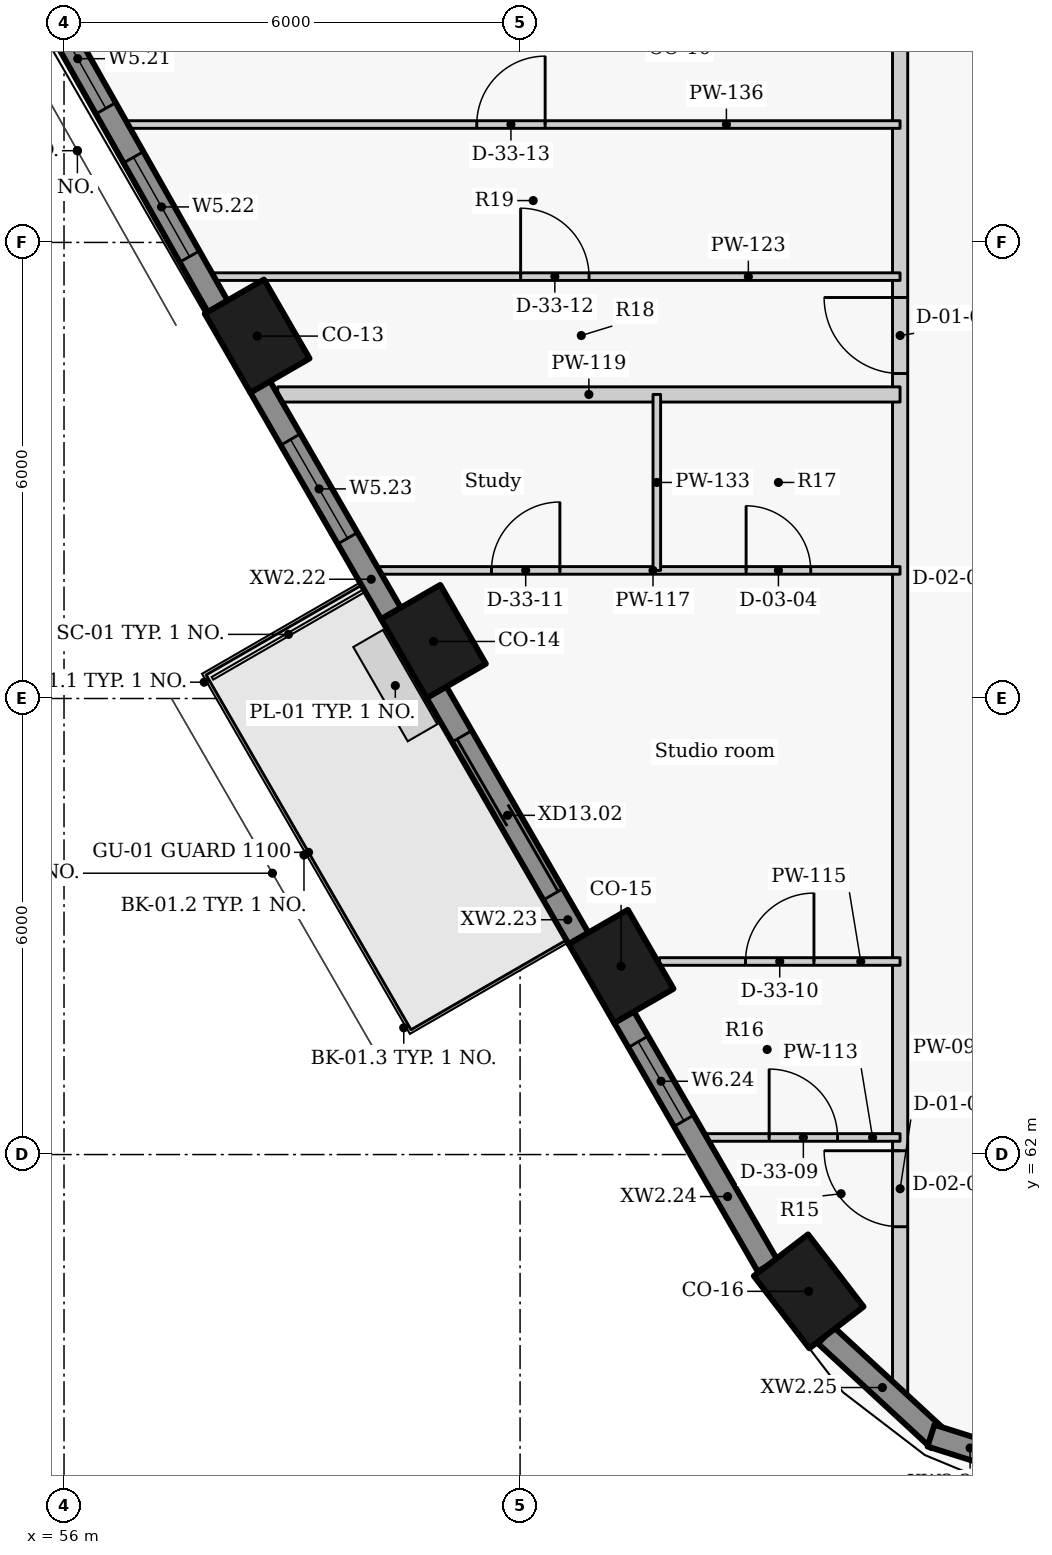
"""IFC4 building model, lengths in metres.
Left out: names, types, materials, properties, quantities, classifications, styles, units other than length and angle.
Written with IfcOpenShell. Run it as: python <this file> out.ifc"""

import sys

from ifc_helpers import new_model, si_unit, direction, frame, frame_2d, origin, origin_2d, place, context, subcontext, project, spatial, rectangle, extrude, element, fill, save


model = new_model("IFC4")
c1 = context("Model", 3, precision=1e-05, world=origin(), true_north=direction((0.0, 1.0)))
c2 = subcontext(c1, "Body", "Model", "MODEL_VIEW")
j1 = project(units=[si_unit("LENGTHUNIT", "METRE"), si_unit("PLANEANGLEUNIT", "RADIAN")], contexts=[c1])
p1 = place(None, origin())
s1 = spatial("IfcSite", under=j1, at=p1, CompositionType="ELEMENT")
p2 = place(p1, origin())
s2 = spatial("IfcBuilding", under=s1, at=p2, CompositionType="ELEMENT")
p3 = place(p2, frame((0.0, 0.0, 176.7)))
s3 = spatial("IfcBuildingStorey", under=s2, at=p3, CompositionType="ELEMENT", Elevation=176.7)
for number, where, z_axis, x_axis in (
    (1, (58.541, 72.768, 0.0), (0.0, 0.0, 1.0), (0.5, -0.866, 0.0)),
    (2, (60.861, 68.75, 0.0), (0.0, 0.0, 1.0), (0.5, -0.866, 0.0)),
    (3, (63.329, 64.475, 0.0), (0.0, 0.0, 1.0), (0.5, -0.866, 0.0)),
    (4, (65.797, 60.2, 0.0), (0.0, 0.0, 1.0), (0.609, -0.793, 0.0)),
):
    element("IfcColumn", number, at=place(p3, frame(where, z_axis=z_axis, x_axis=x_axis)), inside=s3, PredefinedType="COLUMN", context=c2, shape_type="SweptSolid", body=[
        extrude(rectangle(XDim=1.2, YDim=0.9, at=origin_2d()), origin(), (0.0, 0.0, 1.0), 3.3),
    ])
p4 = place(p3, frame((55.373, 77.846, 0.0), z_axis=(0.0, 0.0, 1.0), x_axis=(0.492033360928, -0.870576344575, 0.0)))
e5 = element("IfcWall", 5, at=p4, inside=s3, PredefinedType="SOLIDWALL", context=c2, shape_type="SweptSolid", body=[
    extrude(rectangle(XDim=5.387, YDim=0.3, at=frame_2d((2.693, 0.0))), origin(), (0.0, 0.0, 1.0), 2.425),
])
p5 = place(p4, frame((0.892, 0.0, 0.9)))
e6 = element("IfcOpeningElement", 6, at=p5, cuts=e5, PredefinedType="OPENING", context=c2, shape_type="SweptSolid", body=[
    extrude(rectangle(XDim=1.5, YDim=1.1, at=frame_2d((0.75, 0.55))), frame((0.0, 0.16, 0.0), z_axis=(0.0, -1.0, 0.0), x_axis=(1.0, 0.0, 0.0)), (0.0, 0.0, 1.0), 0.32),
])
p6 = place(p4, frame((3.132, 0.0, 0.9)))
e7 = element("IfcOpeningElement", 7, at=p6, cuts=e5, PredefinedType="OPENING", context=c2, shape_type="SweptSolid", body=[
    extrude(rectangle(XDim=1.5, YDim=1.1, at=frame_2d((0.75, 0.55))), frame((0.0, 0.16, 0.0), z_axis=(0.0, -1.0, 0.0), x_axis=(1.0, 0.0, 0.0)), (0.0, 0.0, 1.0), 0.32),
])
p7 = place(p3, frame((58.579, 72.102, 0.0), z_axis=(0.0, 0.0, 1.0), x_axis=(0.499955427682, -0.866051136095, 0.0)))
e8 = element("IfcWall", 8, at=p7, inside=s3, PredefinedType="SOLIDWALL", context=c2, shape_type="SweptSolid", body=[
    extrude(rectangle(XDim=3.447, YDim=0.3, at=frame_2d((1.724, 0.0))), origin(), (0.0, 0.0, 1.0), 2.425),
])
p8 = place(p7, frame((0.802, 0.0, 0.9)))
e9 = element("IfcOpeningElement", 9, at=p8, cuts=e8, PredefinedType="OPENING", context=c2, shape_type="SweptSolid", body=[
    extrude(rectangle(XDim=1.5, YDim=1.1, at=frame_2d((0.75, 0.55))), frame((0.0, 0.16, 0.0), z_axis=(0.0, -1.0, 0.0), x_axis=(1.0, 0.0, 0.0)), (0.0, 0.0, 1.0), 0.32),
])
p9 = place(p3, frame((60.899, 68.084, 0.0), z_axis=(0.0, 0.0, 1.0), x_axis=(0.500059225181, -0.86599120741, 0.0)))
e10 = element("IfcWall", 10, at=p9, inside=s3, PredefinedType="SOLIDWALL", context=c2, shape_type="SweptSolid", body=[
    extrude(rectangle(XDim=3.744, YDim=0.3, at=frame_2d((1.872, 0.0))), origin(), (0.0, 0.0, 1.0), 2.425),
])
p10 = place(p9, frame((0.672, 0.0, 0.0)))
e11 = element("IfcOpeningElement", 11, at=p10, cuts=e10, PredefinedType="OPENING", context=c2, shape_type="SweptSolid", body=[
    extrude(rectangle(XDim=2.4, YDim=2.0, at=frame_2d((1.2, 1.0))), frame((0.0, 0.16, 0.0), z_axis=(0.0, -1.0, 0.0), x_axis=(1.0, 0.0, 0.0)), (0.0, 0.0, 1.0), 0.32),
])
p11 = place(p3, frame((63.367, 63.809, 0.0), z_axis=(0.0, 0.0, 1.0), x_axis=(0.499961087031, -0.866047869032, 0.0)))
e12 = element("IfcWall", 12, at=p11, inside=s3, PredefinedType="SOLIDWALL", context=c2, shape_type="SweptSolid", body=[
    extrude(rectangle(XDim=3.779, YDim=0.3, at=frame_2d((1.889, 0.0))), origin(), (0.0, 0.0, 1.0), 2.425),
])
p12 = place(p11, frame((0.376, 0.0, 0.9)))
e13 = element("IfcOpeningElement", 13, at=p12, cuts=e12, PredefinedType="OPENING", context=c2, shape_type="SweptSolid", body=[
    extrude(rectangle(XDim=1.2, YDim=1.1, at=frame_2d((0.6, 0.55))), frame((0.0, 0.16, 0.0), z_axis=(0.0, -1.0, 0.0), x_axis=(1.0, 0.0, 0.0)), (0.0, 0.0, 1.0), 0.32),
])
p13 = place(p3, frame((66.022, 59.622, 0.0), z_axis=(0.0, 0.0, 1.0), x_axis=(0.734627852992, -0.678470277616, 0.0)))
e14 = element("IfcWall", 14, at=p13, inside=s3, PredefinedType="SOLIDWALL", context=c2, shape_type="SweptSolid", body=[
    extrude(rectangle(XDim=2.026, YDim=0.3, at=frame_2d((1.013, 0.0))), origin(), (0.0, 0.0, 1.0), 2.425),
])
p14 = place(p3, frame((67.406, 58.302, 0.0), z_axis=(0.0, 0.0, 1.0), x_axis=(0.953537608367, -0.301274010545, 0.0)))
e15 = element("IfcWall", 15, at=p14, inside=s3, PredefinedType="SOLIDWALL", context=c2, shape_type="SweptSolid", body=[
    extrude(rectangle(XDim=2.048, YDim=0.3, at=frame_2d((1.024, 0.0))), origin(), (0.0, 0.0, 1.0), 2.425),
])
p15 = place(p14, frame((1.18, 0.0, 0.9)))
e16 = element("IfcOpeningElement", 16, at=p15, cuts=e15, PredefinedType="OPENING", context=c2, shape_type="SweptSolid", body=[
    extrude(rectangle(XDim=0.6, YDim=1.1, at=frame_2d((0.3, 0.55))), frame((0.0, 0.16, 0.0), z_axis=(0.0, -1.0, 0.0), x_axis=(1.0, 0.0, 0.0)), (0.0, 0.0, 1.0), 0.32),
])
p16 = place(p3, frame((67.0, 58.674, 0.0), z_axis=(0.0, 0.0, 1.0), x_axis=(0.0, 1.0, 0.0)))
e17 = element("IfcWall", 17, at=p16, inside=s3, PredefinedType="PARTITIONING", context=c2, shape_type="SweptSolid", body=[
    extrude(rectangle(XDim=42.592, YDim=0.2, at=frame_2d((21.296, 0.0))), origin(), (0.0, 0.0, 1.0), 2.405),
])
p17 = place(p16, frame((2.376, 0.0, 0.0)))
e18 = element("IfcOpeningElement", 18, at=p17, cuts=e17, PredefinedType="OPENING", context=c2, shape_type="SweptSolid", body=[
    extrude(rectangle(XDim=1.0, YDim=2.1, at=frame_2d((0.5, 1.05))), frame((0.0, 0.11, 0.0), z_axis=(0.0, -1.0, 0.0), x_axis=(1.0, 0.0, 0.0)), (0.0, 0.0, 1.0), 0.22),
])
p18 = place(p16, frame((13.601, 0.0, 0.0)))
e19 = element("IfcOpeningElement", 19, at=p18, cuts=e17, PredefinedType="OPENING", context=c2, shape_type="SweptSolid", body=[
    extrude(rectangle(XDim=1.0, YDim=2.1, at=frame_2d((0.5, 1.05))), frame((0.0, 0.11, 0.0), z_axis=(0.0, -1.0, 0.0), x_axis=(1.0, 0.0, 0.0)), (0.0, 0.0, 1.0), 0.22),
])
p19 = place(p16, frame((30.026, 0.0, 0.0)))
e20 = element("IfcOpeningElement", 20, at=p19, cuts=e17, PredefinedType="OPENING", context=c2, shape_type="SweptSolid", body=[
    extrude(rectangle(XDim=1.0, YDim=2.1, at=frame_2d((0.5, 1.05))), frame((0.0, 0.11, 0.0), z_axis=(0.0, -1.0, 0.0), x_axis=(1.0, 0.0, 0.0)), (0.0, 0.0, 1.0), 0.22),
])
p20 = place(p16, frame((36.457, 0.0, 0.0)))
e21 = element("IfcOpeningElement", 21, at=p20, cuts=e17, PredefinedType="OPENING", context=c2, shape_type="SweptSolid", body=[
    extrude(rectangle(XDim=1.0, YDim=2.1, at=frame_2d((0.5, 1.05))), frame((0.0, 0.11, 0.0), z_axis=(0.0, -1.0, 0.0), x_axis=(1.0, 0.0, 0.0)), (0.0, 0.0, 1.0), 0.22),
])
p21 = place(p3, frame((64.455, 62.225, 0.0), z_axis=(0.0, 0.0, 1.0), x_axis=(1.0, 0.0, 0.0)))
e22 = element("IfcWall", 22, at=p21, inside=s3, PredefinedType="PARTITIONING", context=c2, shape_type="SweptSolid", body=[
    extrude(rectangle(XDim=2.544, YDim=0.1, at=frame_2d((1.272, 0.0))), origin(), (0.0, 0.0, 1.0), 2.405),
])
p22 = place(p21, frame((0.822, 0.0, 0.0)))
e23 = element("IfcOpeningElement", 23, at=p22, cuts=e22, PredefinedType="OPENING", context=c2, shape_type="SweptSolid", body=[
    extrude(rectangle(XDim=0.9, YDim=2.1, at=frame_2d((0.45, 1.05))), frame((0.0, 0.06, 0.0), z_axis=(0.0, -1.0, 0.0), x_axis=(1.0, 0.0, 0.0)), (0.0, 0.0, 1.0), 0.12),
])
p23 = place(p3, frame((63.834, 64.54, 0.0), z_axis=(0.0, 0.0, 1.0), x_axis=(1.0, 0.0, 0.0)))
e24 = element("IfcWall", 24, at=p23, inside=s3, PredefinedType="PARTITIONING", context=c2, shape_type="SweptSolid", body=[
    extrude(rectangle(XDim=3.165, YDim=0.1, at=frame_2d((1.583, 0.0))), origin(), (0.0, 0.0, 1.0), 3.025),
])
p24 = place(p23, frame((1.132, 0.0, 0.0)))
e25 = element("IfcOpeningElement", 25, at=p24, cuts=e24, PredefinedType="OPENING", context=c2, shape_type="SweptSolid", body=[
    extrude(rectangle(XDim=0.9, YDim=2.1, at=frame_2d((0.45, 1.05))), frame((0.0, 0.06, 0.0), z_axis=(0.0, -1.0, 0.0), x_axis=(1.0, 0.0, 0.0)), (0.0, 0.0, 1.0), 0.12),
])
p25 = place(p3, frame((60.148, 69.685, 0.0), z_axis=(0.0, 0.0, 1.0), x_axis=(1.0, 0.0, 0.0)))
e26 = element("IfcWall", 26, at=p25, inside=s3, PredefinedType="PARTITIONING", context=c2, shape_type="SweptSolid", body=[
    extrude(rectangle(XDim=6.851, YDim=0.1, at=frame_2d((3.426, 0.0))), origin(), (0.0, 0.0, 1.0), 2.405),
])
p26 = place(p25, frame((4.826, 0.0, 0.0)))
e27 = element("IfcOpeningElement", 27, at=p26, cuts=e26, PredefinedType="OPENING", context=c2, shape_type="SweptSolid", body=[
    extrude(rectangle(XDim=0.85, YDim=2.1, at=frame_2d((0.425, 1.05))), frame((0.0, 0.06, 0.0), z_axis=(0.0, -1.0, 0.0), x_axis=(1.0, 0.0, 0.0)), (0.0, 0.0, 1.0), 0.12),
])
p27 = place(p25, frame((1.476, 0.0, 0.0)))
e28 = element("IfcOpeningElement", 28, at=p27, cuts=e26, PredefinedType="OPENING", context=c2, shape_type="SweptSolid", body=[
    extrude(rectangle(XDim=0.9, YDim=2.1, at=frame_2d((0.45, 1.05))), frame((0.0, 0.06, 0.0), z_axis=(0.0, -1.0, 0.0), x_axis=(1.0, 0.0, 0.0)), (0.0, 0.0, 1.0), 0.12),
])
p28 = place(p3, frame((58.811, 72.0, 0.0), z_axis=(0.0, 0.0, 1.0), x_axis=(1.0, 0.0, 0.0)))
e29 = element("IfcWall", 29, at=p28, inside=s3, PredefinedType="PARTITIONING", context=c2, shape_type="SweptSolid", body=[
    extrude(rectangle(XDim=8.188, YDim=0.2, at=frame_2d((4.094, 0.0))), origin(), (0.0, 0.0, 1.0), 2.405),
])
p29 = place(p3, frame((57.916, 73.55, 0.0), z_axis=(0.0, 0.0, 1.0), x_axis=(1.0, 0.0, 0.0)))
e30 = element("IfcWall", 30, at=p29, inside=s3, PredefinedType="PARTITIONING", context=c2, shape_type="SweptSolid", body=[
    extrude(rectangle(XDim=9.083, YDim=0.1, at=frame_2d((4.542, 0.0))), origin(), (0.0, 0.0, 1.0), 2.405),
])
p30 = place(p29, frame((4.091, 0.0, 0.0)))
e31 = element("IfcOpeningElement", 31, at=p30, cuts=e30, PredefinedType="OPENING", context=c2, shape_type="SweptSolid", body=[
    extrude(rectangle(XDim=0.9, YDim=2.1, at=frame_2d((0.45, 1.05))), frame((0.0, 0.06, 0.0), z_axis=(0.0, -1.0, 0.0), x_axis=(1.0, 0.0, 0.0)), (0.0, 0.0, 1.0), 0.12),
])
p31 = place(p3, frame((63.799, 69.685, 0.0), z_axis=(0.0, 0.0, 1.0), x_axis=(0.0, 1.0, 0.0)))
e32 = element("IfcWall", 32, at=p31, inside=s3, PredefinedType="PARTITIONING", context=c2, shape_type="SweptSolid", body=[
    extrude(rectangle(XDim=2.315, YDim=0.1, at=frame_2d((1.158, 0.0))), origin(), (0.0, 0.0, 1.0), 3.025),
])
p32 = place(p3, frame((56.761, 75.551, 0.0), z_axis=(0.0, 0.0, 1.0), x_axis=(1.0, 0.0, 0.0)))
e33 = element("IfcWall", 33, at=p32, inside=s3, PredefinedType="PARTITIONING", context=c2, shape_type="SweptSolid", body=[
    extrude(rectangle(XDim=10.238, YDim=0.1, at=frame_2d((5.119, 0.0))), origin(), (0.0, 0.0, 1.0), 2.405),
])
p33 = place(p32, frame((4.669, 0.0, 0.0)))
e34 = element("IfcOpeningElement", 34, at=p33, cuts=e33, PredefinedType="OPENING", context=c2, shape_type="SweptSolid", body=[
    extrude(rectangle(XDim=0.9, YDim=2.1, at=frame_2d((0.45, 1.05))), frame((0.0, 0.06, 0.0), z_axis=(0.0, -1.0, 0.0), x_axis=(1.0, 0.0, 0.0)), (0.0, 0.0, 1.0), 0.12),
])
p34 = place(p5, origin())
e35 = element("IfcWindow", 35, at=p34, inside=s3, PartitioningType="SINGLE_PANEL", PredefinedType="WINDOW", context=c2, shape_type="SweptSolid", body=[
    extrude(rectangle(XDim=1.5, YDim=1.1, at=frame_2d((0.75, 0.55))), frame((0.0, 0.03, 0.0), z_axis=(0.0, -1.0, 0.0), x_axis=(1.0, 0.0, 0.0)), (0.0, 0.0, 1.0), 0.06),
])
fill(e6, e35)
p35 = place(p6, origin())
e36 = element("IfcWindow", 36, at=p35, inside=s3, PartitioningType="SINGLE_PANEL", PredefinedType="WINDOW", context=c2, shape_type="SweptSolid", body=[
    extrude(rectangle(XDim=1.5, YDim=1.1, at=frame_2d((0.75, 0.55))), frame((0.0, 0.03, 0.0), z_axis=(0.0, -1.0, 0.0), x_axis=(1.0, 0.0, 0.0)), (0.0, 0.0, 1.0), 0.06),
])
fill(e7, e36)
p36 = place(p8, origin())
e37 = element("IfcWindow", 37, at=p36, inside=s3, PartitioningType="SINGLE_PANEL", PredefinedType="WINDOW", context=c2, shape_type="SweptSolid", body=[
    extrude(rectangle(XDim=1.5, YDim=1.1, at=frame_2d((0.75, 0.55))), frame((0.0, 0.03, 0.0), z_axis=(0.0, -1.0, 0.0), x_axis=(1.0, 0.0, 0.0)), (0.0, 0.0, 1.0), 0.06),
])
fill(e9, e37)
p37 = place(p10, origin())
e38 = element("IfcDoor", 38, at=p37, inside=s3, OperationType="DOUBLE_DOOR_SLIDING", PredefinedType="DOOR", context=c2, shape_type="SweptSolid", body=[
    extrude(rectangle(XDim=2.4, YDim=2.0, at=frame_2d((1.2, 1.0))), frame((0.0, 0.025, 0.0), z_axis=(0.0, -1.0, 0.0), x_axis=(1.0, 0.0, 0.0)), (0.0, 0.0, 1.0), 0.05),
])
fill(e11, e38)
p38 = place(p12, origin())
e39 = element("IfcWindow", 39, at=p38, inside=s3, PartitioningType="SINGLE_PANEL", PredefinedType="WINDOW", context=c2, shape_type="SweptSolid", body=[
    extrude(rectangle(XDim=1.2, YDim=1.1, at=frame_2d((0.6, 0.55))), frame((0.0, 0.03, 0.0), z_axis=(0.0, -1.0, 0.0), x_axis=(1.0, 0.0, 0.0)), (0.0, 0.0, 1.0), 0.06),
])
fill(e13, e39)
p39 = place(p17, origin())
e40 = element("IfcDoor", 40, at=p39, inside=s3, OperationType="SINGLE_SWING_RIGHT", PredefinedType="DOOR", context=c2, shape_type="SweptSolid", body=[
    extrude(rectangle(XDim=1.0, YDim=2.1, at=frame_2d((0.5, 1.05))), frame((0.0, 0.025, 0.0), z_axis=(0.0, -1.0, 0.0), x_axis=(1.0, 0.0, 0.0)), (0.0, 0.0, 1.0), 0.05),
])
fill(e18, e40)
p40 = place(p22, origin())
e41 = element("IfcDoor", 41, at=p40, inside=s3, OperationType="SINGLE_SWING_LEFT", PredefinedType="DOOR", context=c2, shape_type="SweptSolid", body=[
    extrude(rectangle(XDim=0.9, YDim=2.1, at=frame_2d((0.45, 1.05))), frame((0.0, 0.025, 0.0), z_axis=(0.0, -1.0, 0.0), x_axis=(1.0, 0.0, 0.0)), (0.0, 0.0, 1.0), 0.05),
])
fill(e23, e41)
p41 = place(p24, origin())
e42 = element("IfcDoor", 42, at=p41, inside=s3, OperationType="SINGLE_SWING_RIGHT", PredefinedType="DOOR", context=c2, shape_type="SweptSolid", body=[
    extrude(rectangle(XDim=0.9, YDim=2.1, at=frame_2d((0.45, 1.05))), frame((0.0, 0.025, 0.0), z_axis=(0.0, -1.0, 0.0), x_axis=(1.0, 0.0, 0.0)), (0.0, 0.0, 1.0), 0.05),
])
fill(e25, e42)
p42 = place(p26, origin())
e43 = element("IfcDoor", 43, at=p42, inside=s3, OperationType="SINGLE_SWING_LEFT", PredefinedType="DOOR", context=c2, shape_type="SweptSolid", body=[
    extrude(rectangle(XDim=0.85, YDim=2.1, at=frame_2d((0.425, 1.05))), frame((0.0, 0.025, 0.0), z_axis=(0.0, -1.0, 0.0), x_axis=(1.0, 0.0, 0.0)), (0.0, 0.0, 1.0), 0.05),
])
fill(e27, e43)
p43 = place(p27, origin())
e44 = element("IfcDoor", 44, at=p43, inside=s3, OperationType="SINGLE_SWING_RIGHT", PredefinedType="DOOR", context=c2, shape_type="SweptSolid", body=[
    extrude(rectangle(XDim=0.9, YDim=2.1, at=frame_2d((0.45, 1.05))), frame((0.0, 0.025, 0.0), z_axis=(0.0, -1.0, 0.0), x_axis=(1.0, 0.0, 0.0)), (0.0, 0.0, 1.0), 0.05),
])
fill(e28, e44)
p44 = place(p18, origin())
e45 = element("IfcDoor", 45, at=p44, inside=s3, OperationType="SINGLE_SWING_RIGHT", PredefinedType="DOOR", context=c2, shape_type="SweptSolid", body=[
    extrude(rectangle(XDim=1.0, YDim=2.1, at=frame_2d((0.5, 1.05))), frame((0.0, 0.025, 0.0), z_axis=(0.0, -1.0, 0.0), x_axis=(1.0, 0.0, 0.0)), (0.0, 0.0, 1.0), 0.05),
])
fill(e19, e45)
p45 = place(p30, origin())
e46 = element("IfcDoor", 46, at=p45, inside=s3, OperationType="SINGLE_SWING_LEFT", PredefinedType="DOOR", context=c2, shape_type="SweptSolid", body=[
    extrude(rectangle(XDim=0.9, YDim=2.1, at=frame_2d((0.45, 1.05))), frame((0.0, 0.025, 0.0), z_axis=(0.0, -1.0, 0.0), x_axis=(1.0, 0.0, 0.0)), (0.0, 0.0, 1.0), 0.05),
])
fill(e31, e46)
p46 = place(p33, origin())
e47 = element("IfcDoor", 47, at=p46, inside=s3, OperationType="SINGLE_SWING_RIGHT", PredefinedType="DOOR", context=c2, shape_type="SweptSolid", body=[
    extrude(rectangle(XDim=0.9, YDim=2.1, at=frame_2d((0.45, 1.05))), frame((0.0, 0.025, 0.0), z_axis=(0.0, -1.0, 0.0), x_axis=(1.0, 0.0, 0.0)), (0.0, 0.0, 1.0), 0.05),
])
fill(e34, e47)
save(model, sys.argv[1])
